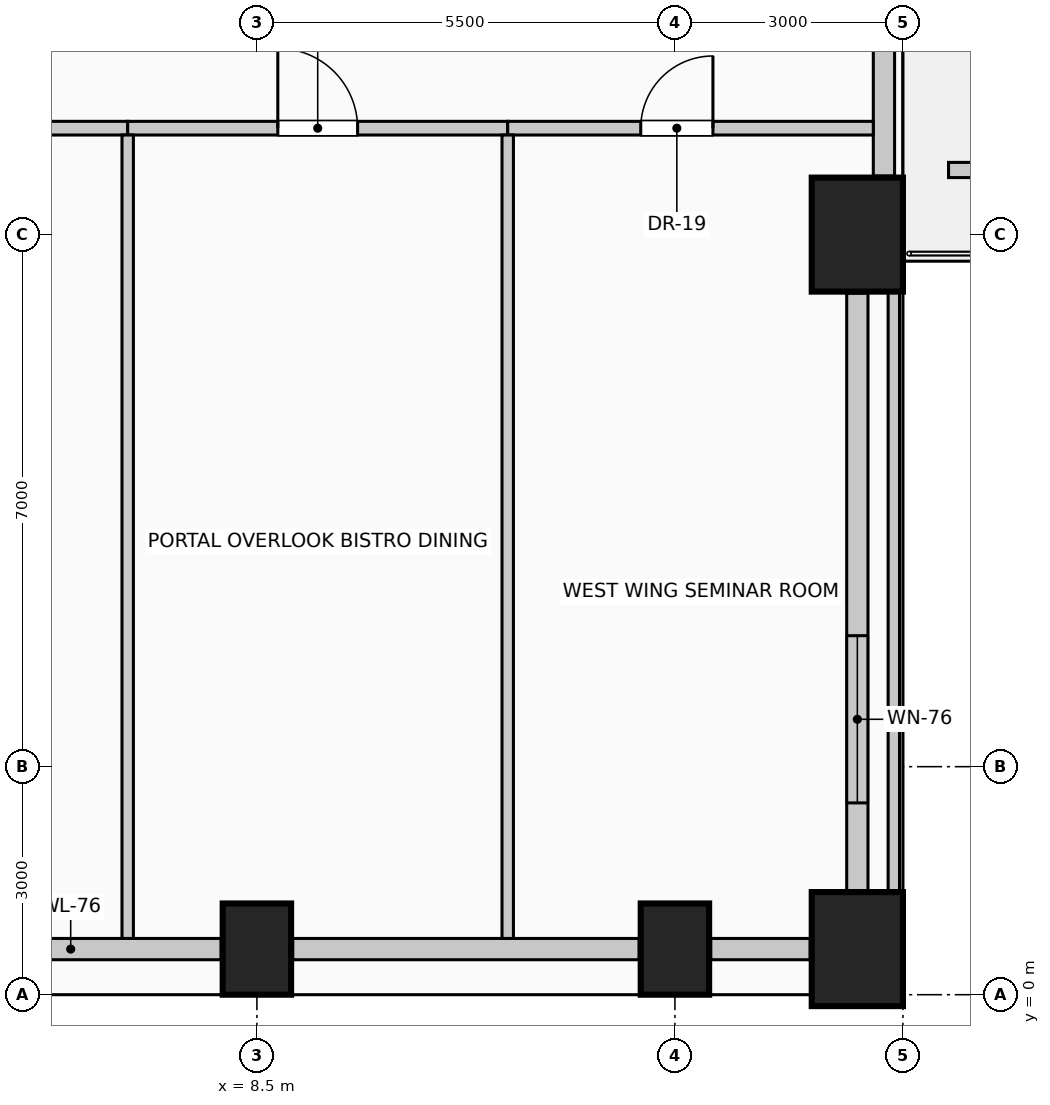
"""IFC4 building model, lengths in metres.
Left out: names, types, materials, properties, quantities, classifications, styles, units other than length and angle.
Written with IfcOpenShell. Run it as: python <this file> out.ifc"""

import sys

from ifc_helpers import new_model, si_unit, direction, frame, frame_2d, origin, origin_2d, place, context, subcontext, project, spatial, rectangle, extrude, element, fill, save


model = new_model("IFC4")
c1 = context("Model", 3, precision=1e-05, world=origin(), true_north=direction((0.0, 1.0)))
c2 = subcontext(c1, "Body", "Model", "MODEL_VIEW")
j1 = project(units=[si_unit("LENGTHUNIT", "METRE"), si_unit("PLANEANGLEUNIT", "RADIAN")], contexts=[c1])
p1 = place(None, origin())
s1 = spatial("IfcSite", under=j1, at=p1, CompositionType="ELEMENT")
p2 = place(p1, origin())
s2 = spatial("IfcBuilding", under=s1, at=p2, CompositionType="ELEMENT")
p3 = place(p2, frame((0.0, 0.0, 30.6)))
s3 = spatial("IfcBuildingStorey", under=s2, at=p3, CompositionType="ELEMENT", Elevation=30.6)
for number, where, z_axis, x_axis in (
    (1, (8.5, 0.6, 0.0), (0.0, 0.0, 1.0), (1.0, 0.0, 0.0)),
    (2, (14.0, 0.6, 0.0), (0.0, 0.0, 1.0), (1.0, 0.0, 0.0)),
):
    element("IfcColumn", number, at=place(p3, frame(where, z_axis=z_axis, x_axis=x_axis)), inside=s3, PredefinedType="COLUMN", context=c2, shape_type="SweptSolid", body=[
        extrude(rectangle(XDim=0.9, YDim=1.2, at=origin_2d()), origin(), (0.0, 0.0, 1.0), 4.0),
    ])
for number, where, z_axis, x_axis in (
    (3, (16.4, 0.6, 0.0), (0.0, 0.0, 1.0), (1.0, 0.0, 0.0)),
    (4, (16.4, 10.0, 0.0), (0.0, 0.0, 1.0), (1.0, 0.0, 0.0)),
):
    element("IfcColumn", number, at=place(p3, frame(where, z_axis=z_axis, x_axis=x_axis)), inside=s3, PredefinedType="COLUMN", context=c2, shape_type="SweptSolid", body=[
        extrude(rectangle(XDim=1.2, YDim=1.5, at=origin_2d()), origin(), (0.0, 0.0, 1.0), 4.0),
    ])
p4 = place(p3, frame((8.03, 0.6, 0.0), z_axis=(0.0, 0.0, 1.0), x_axis=(-1.0, 0.0, 0.0)))
e5 = element("IfcWall", 5, at=p4, inside=s3, PredefinedType="SOLIDWALL", context=c2, shape_type="SweptSolid", body=[
    extrude(rectangle(XDim=3.96, YDim=0.28, at=frame_2d((1.98, 0.0))), origin(), (0.0, 0.0, 1.0), 2.85),
])
p5 = place(p3, frame((13.53, 0.6, 0.0), z_axis=(0.0, 0.0, 1.0), x_axis=(-1.0, 0.0, 0.0)))
e6 = element("IfcWall", 6, at=p5, inside=s3, PredefinedType="SOLIDWALL", context=c2, shape_type="SweptSolid", body=[
    extrude(rectangle(XDim=4.56, YDim=0.28, at=frame_2d((2.28, 0.0))), origin(), (0.0, 0.0, 1.0), 2.85),
])
p6 = place(p3, frame((15.78, 0.6, 0.0), z_axis=(0.0, 0.0, 1.0), x_axis=(-1.0, 0.0, 0.0)))
e7 = element("IfcWall", 7, at=p6, inside=s3, PredefinedType="SOLIDWALL", context=c2, shape_type="SweptSolid", body=[
    extrude(rectangle(XDim=1.31, YDim=0.28, at=frame_2d((0.655, 0.0))), origin(), (0.0, 0.0, 1.0), 2.85),
])
p7 = place(p3, frame((16.4, 9.23, 0.0), z_axis=(0.0, 0.0, 1.0), x_axis=(0.0, -1.0, 0.0)))
e8 = element("IfcWall", 8, at=p7, inside=s3, PredefinedType="SOLIDWALL", context=c2, shape_type="SweptSolid", body=[
    extrude(rectangle(XDim=7.86, YDim=0.28, at=frame_2d((3.93, 0.0))), origin(), (0.0, 0.0, 1.0), 3.0),
])
p8 = place(p7, frame((4.507, 0.0, 0.42)))
e9 = element("IfcOpeningElement", 9, at=p8, cuts=e8, PredefinedType="OPENING", context=c2, shape_type="SweptSolid", body=[
    extrude(rectangle(XDim=2.2, YDim=1.95, at=frame_2d((1.1, 0.975))), frame((0.0, 0.15, 0.0), z_axis=(0.0, -1.0, 0.0), x_axis=(1.0, 0.0, 0.0)), (0.0, 0.0, 1.0), 0.3),
])
p9 = place(p3, frame((16.75, 17.23, 0.0), z_axis=(0.0, 0.0, 1.0), x_axis=(0.0, -1.0, 0.0)))
e10 = element("IfcWall", 10, at=p9, inside=s3, PredefinedType="SOLIDWALL", context=c2, shape_type="SweptSolid", body=[
    extrude(rectangle(XDim=6.46, YDim=0.28, at=frame_2d((3.23, 0.0))), origin(), (0.0, 0.0, 1.0), 3.7),
])
p10 = place(p9, frame((2.63, 0.0, 0.0)))
e11 = element("IfcOpeningElement", 11, at=p10, cuts=e10, PredefinedType="OPENING", context=c2, shape_type="SweptSolid", body=[
    extrude(rectangle(XDim=1.2, YDim=2.25, at=frame_2d((0.6, 1.125))), frame((0.0, 0.15, 0.0), z_axis=(0.0, -1.0, 0.0), x_axis=(1.0, 0.0, 0.0)), (0.0, 0.0, 1.0), 0.3),
])
p11 = place(p3, frame((17.6, 10.85, 0.0), z_axis=(0.0, 0.0, 1.0), x_axis=(1.0, 0.0, 0.0)))
e12 = element("IfcWall", 12, at=p11, inside=s3, PredefinedType="USERDEFINED", context=c2, shape_type="SweptSolid", body=[
    extrude(rectangle(XDim=22.8, YDim=0.2, at=frame_2d((11.4, 0.0))), origin(), (0.0, 0.0, 1.0), 0.55),
])
p12 = place(p3, frame((3.55, 11.4, 0.0), z_axis=(0.0, 0.0, 1.0), x_axis=(1.0, 0.0, 0.0)))
e13 = element("IfcWall", 13, at=p12, inside=s3, PredefinedType="PARTITIONING", context=c2, shape_type="SweptSolid", body=[
    extrude(rectangle(XDim=3.25, YDim=0.18, at=frame_2d((1.625, 0.0))), origin(), (0.0, 0.0, 1.0), 3.095),
])
p13 = place(p3, frame((6.8, 11.4, 0.0), z_axis=(0.0, 0.0, 1.0), x_axis=(1.0, 0.0, 0.0)))
e14 = element("IfcWall", 14, at=p13, inside=s3, PredefinedType="PARTITIONING", context=c2, shape_type="SweptSolid", body=[
    extrude(rectangle(XDim=5.0, YDim=0.18, at=frame_2d((2.5, 0.0))), origin(), (0.0, 0.0, 1.0), 3.095),
])
p14 = place(p13, frame((1.975, 0.0, 0.0)))
e15 = element("IfcOpeningElement", 15, at=p14, cuts=e14, PredefinedType="OPENING", context=c2, shape_type="SweptSolid", body=[
    extrude(rectangle(XDim=1.05, YDim=2.15, at=frame_2d((0.525, 1.075))), frame((0.0, 0.1, 0.0), z_axis=(0.0, -1.0, 0.0), x_axis=(1.0, 0.0, 0.0)), (0.0, 0.0, 1.0), 0.2),
])
p15 = place(p3, frame((11.8, 11.4, 0.0), z_axis=(0.0, 0.0, 1.0), x_axis=(1.0, 0.0, 0.0)))
e16 = element("IfcWall", 16, at=p15, inside=s3, PredefinedType="PARTITIONING", context=c2, shape_type="SweptSolid", body=[
    extrude(rectangle(XDim=4.81, YDim=0.18, at=frame_2d((2.405, 0.0))), origin(), (0.0, 0.0, 1.0), 3.095),
])
p16 = place(p15, frame((1.75, 0.0, 0.0)))
e17 = element("IfcOpeningElement", 17, at=p16, cuts=e16, PredefinedType="OPENING", context=c2, shape_type="SweptSolid", body=[
    extrude(rectangle(XDim=0.95, YDim=2.15, at=frame_2d((0.475, 1.075))), frame((0.0, 0.1, 0.0), z_axis=(0.0, -1.0, 0.0), x_axis=(1.0, 0.0, 0.0)), (0.0, 0.0, 1.0), 0.2),
])
for number, where, z_axis, x_axis in (
    (18, (6.8, 0.74, 0.0), (0.0, 0.0, 1.0), (0.0, 1.0, 0.0)),
    (19, (11.8, 0.74, 0.0), (0.0, 0.0, 1.0), (0.0, 1.0, 0.0)),
):
    element("IfcWall", number, at=place(p3, frame(where, z_axis=z_axis, x_axis=x_axis)), inside=s3, PredefinedType="PARTITIONING", context=c2, shape_type="SweptSolid", body=[
        extrude(rectangle(XDim=10.57, YDim=0.15, at=frame_2d((5.285, 0.0))), origin(), (0.0, 0.0, 1.0), 3.7),
    ])
p17 = place(p3, frame((16.88, 1.35, 0.0), z_axis=(0.0, 0.0, 1.0), x_axis=(0.0, 1.0, 0.0)))
e20 = element("IfcWall", 20, at=p17, inside=s3, PredefinedType="PARTITIONING", context=c2, shape_type="SweptSolid", body=[
    extrude(rectangle(XDim=7.9, YDim=0.15, at=frame_2d((3.95, 0.0))), origin(), (0.0, 0.0, 1.0), 3.7),
])
p18 = place(p8, origin())
e21 = element("IfcWindow", 21, at=p18, inside=s3, PartitioningType="SINGLE_PANEL", PredefinedType="WINDOW", context=c2, shape_type="SweptSolid", body=[
    extrude(rectangle(XDim=2.2, YDim=1.95, at=frame_2d((1.1, 0.975))), frame((0.0, 0.03, 0.0), z_axis=(0.0, -1.0, 0.0), x_axis=(1.0, 0.0, 0.0)), (0.0, 0.0, 1.0), 0.06),
])
fill(e9, e21)
p19 = place(p14, origin())
e22 = element("IfcDoor", 22, at=p19, inside=s3, OperationType="SINGLE_SWING_LEFT", PredefinedType="DOOR", context=c2, shape_type="SweptSolid", body=[
    extrude(rectangle(XDim=1.05, YDim=2.15, at=frame_2d((0.525, 1.075))), frame((0.0, 0.025, 0.0), z_axis=(0.0, -1.0, 0.0), x_axis=(1.0, 0.0, 0.0)), (0.0, 0.0, 1.0), 0.05),
])
fill(e15, e22)
p20 = place(p16, origin())
e23 = element("IfcDoor", 23, at=p20, inside=s3, OperationType="SINGLE_SWING_RIGHT", PredefinedType="DOOR", context=c2, shape_type="SweptSolid", body=[
    extrude(rectangle(XDim=0.95, YDim=2.15, at=frame_2d((0.475, 1.075))), frame((0.0, 0.025, 0.0), z_axis=(0.0, -1.0, 0.0), x_axis=(1.0, 0.0, 0.0)), (0.0, 0.0, 1.0), 0.05),
])
fill(e17, e23)
save(model, sys.argv[1])
